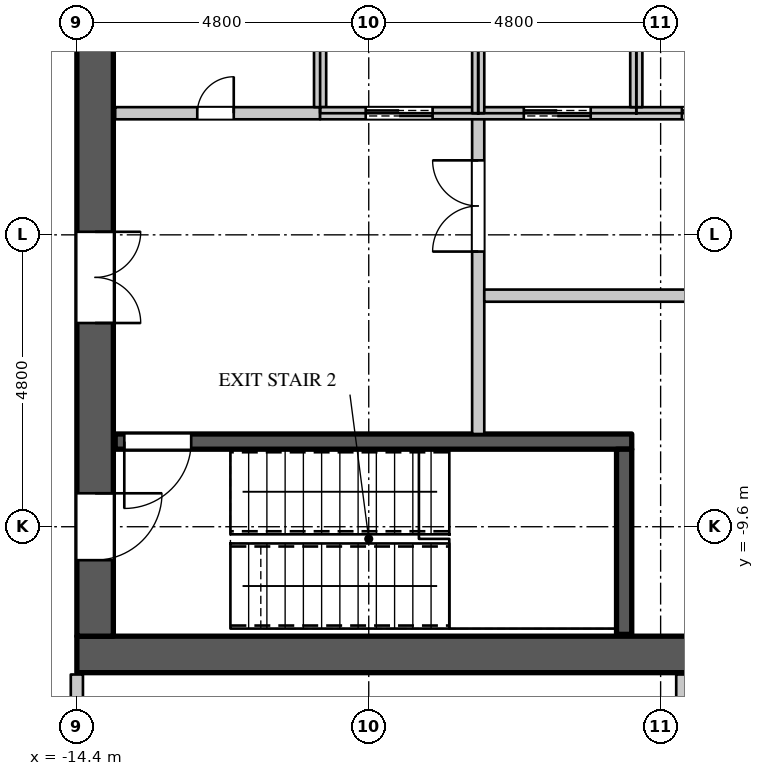
"""IFC4 building model, lengths in metres.
Left out: names, types, materials, properties, quantities, classifications, styles, units other than length and angle.
Written with IfcOpenShell. Run it as: python <this file> out.ifc"""

import sys

from ifc_helpers import new_model, si_unit, direction, frame, frame_2d, origin, place, context, subcontext, project, spatial, rectangle, extrude, element, fill, save


model = new_model("IFC4")
c1 = context("Model", 3, precision=1e-05, world=origin(), true_north=direction((0.0, 1.0)))
c2 = subcontext(c1, "Body", "Model", "MODEL_VIEW")
j1 = project(units=[si_unit("LENGTHUNIT", "METRE"), si_unit("PLANEANGLEUNIT", "RADIAN")], contexts=[c1])
p1 = place(None, origin())
s1 = spatial("IfcSite", under=j1, at=p1, CompositionType="ELEMENT")
p2 = place(p1, origin())
s2 = spatial("IfcBuilding", under=s1, at=p2, CompositionType="ELEMENT")
p3 = place(p2, frame((0.0, 0.0, 239.1)))
s3 = spatial("IfcBuildingStorey", under=s2, at=p3, CompositionType="ELEMENT", Elevation=239.1)
p4 = place(p3, frame((-14.4, -11.7, 0.0), z_axis=(0.0, 0.0, 1.0), x_axis=(1.0, 0.0, 0.0)))
e1 = element("IfcWall", 1, at=p4, inside=s3, PredefinedType="SHEAR", context=c2, shape_type="SweptSolid", body=[
    extrude(rectangle(XDim=28.8, YDim=0.6, at=frame_2d((14.4, 0.0))), origin(), (0.0, 0.0, 1.0), 4.2),
])
p5 = place(p3, frame((-14.1, -11.4, 0.0), z_axis=(0.0, 0.0, 1.0), x_axis=(0.0, 1.0, 0.0)))
e2 = element("IfcWall", 2, at=p5, inside=s3, PredefinedType="SHEAR", context=c2, shape_type="SweptSolid", body=[
    extrude(rectangle(XDim=22.8, YDim=0.6, at=frame_2d((11.4, 0.0))), origin(), (0.0, 0.0, 1.0), 4.2),
])
p6 = place(p5, frame((20.45, 0.0, 0.0)))
e3 = element("IfcOpeningElement", 3, at=p6, cuts=e2, PredefinedType="OPENING", context=c2, shape_type="SweptSolid", body=[
    extrude(rectangle(XDim=1.1, YDim=2.2, at=frame_2d((0.55, 1.1))), frame((0.0, 0.31, 0.0), z_axis=(0.0, -1.0, 0.0), x_axis=(1.0, 0.0, 0.0)), (0.0, 0.0, 1.0), 0.62),
])
p7 = place(p5, frame((1.25, 0.0, 0.0)))
e4 = element("IfcOpeningElement", 4, at=p7, cuts=e2, PredefinedType="OPENING", context=c2, shape_type="SweptSolid", body=[
    extrude(rectangle(XDim=1.1, YDim=2.2, at=frame_2d((0.55, 1.1))), frame((0.0, 0.31, 0.0), z_axis=(0.0, -1.0, 0.0), x_axis=(1.0, 0.0, 0.0)), (0.0, 0.0, 1.0), 0.62),
])
p8 = place(p5, frame((16.15, 0.0, 0.0)))
e5 = element("IfcOpeningElement", 5, at=p8, cuts=e2, PredefinedType="OPENING", context=c2, shape_type="SweptSolid", body=[
    extrude(rectangle(XDim=1.5, YDim=2.4, at=frame_2d((0.75, 1.2))), frame((0.0, 0.31, 0.0), z_axis=(0.0, -1.0, 0.0), x_axis=(1.0, 0.0, 0.0)), (0.0, 0.0, 1.0), 0.62),
])
p9 = place(p5, frame((5.15, 0.0, 0.0)))
e6 = element("IfcOpeningElement", 6, at=p9, cuts=e2, PredefinedType="OPENING", context=c2, shape_type="SweptSolid", body=[
    extrude(rectangle(XDim=1.5, YDim=2.4, at=frame_2d((0.75, 1.2))), frame((0.0, 0.31, 0.0), z_axis=(0.0, -1.0, 0.0), x_axis=(1.0, 0.0, 0.0)), (0.0, 0.0, 1.0), 0.62),
])
p10 = place(p3, frame((-14.4, -14.3, 0.0), z_axis=(0.0, 0.0, 1.0), x_axis=(0.0, 1.0, 0.0)))
e7 = element("IfcWall", 7, at=p10, inside=s3, PredefinedType="PARTITIONING", context=c2, shape_type="SweptSolid", body=[
    extrude(rectangle(XDim=2.27, YDim=0.2, at=frame_2d((1.135, 0.0))), origin(), (0.0, 0.0, 1.0), 3.95),
])
p11 = place(p3, frame((-7.8, -8.075, 0.0), z_axis=(0.0, 0.0, 1.0), x_axis=(0.0, 1.0, 0.0)))
e8 = element("IfcWall", 8, at=p11, inside=s3, PredefinedType="PARTITIONING", context=c2, shape_type="SweptSolid", body=[
    extrude(rectangle(XDim=5.275, YDim=0.2, at=frame_2d((2.637, 0.0))), origin(), (0.0, 0.0, 1.0), 3.95),
])
p12 = place(p11, frame((3.0, 0.0, 0.0)))
e9 = element("IfcOpeningElement", 9, at=p12, cuts=e8, PredefinedType="OPENING", context=c2, shape_type="SweptSolid", body=[
    extrude(rectangle(XDim=1.5, YDim=2.4, at=frame_2d((0.75, 1.2))), frame((0.0, 0.11, 0.0), z_axis=(0.0, -1.0, 0.0), x_axis=(1.0, 0.0, 0.0)), (0.0, 0.0, 1.0), 0.22),
])
p13 = place(p3, frame((-7.7, -5.8, 0.0), z_axis=(0.0, 0.0, 1.0), x_axis=(1.0, 0.0, 0.0)))
e10 = element("IfcWall", 10, at=p13, inside=s3, PredefinedType="PARTITIONING", context=c2, shape_type="SweptSolid", body=[
    extrude(rectangle(XDim=13.12, YDim=0.2, at=frame_2d((6.56, 0.0))), origin(), (0.0, 0.0, 1.0), 3.95),
])
p14 = place(p13, frame((3.45, 0.0, 0.0)))
e11 = element("IfcOpeningElement", 11, at=p14, cuts=e10, PredefinedType="OPENING", context=c2, shape_type="SweptSolid", body=[
    extrude(rectangle(XDim=0.9, YDim=2.2, at=frame_2d((0.45, 1.1))), frame((0.0, 0.11, 0.0), z_axis=(0.0, -1.0, 0.0), x_axis=(1.0, 0.0, 0.0)), (0.0, 0.0, 1.0), 0.22),
])
p15 = place(p13, frame((9.85, 0.0, 0.0)))
e12 = element("IfcOpeningElement", 12, at=p15, cuts=e10, PredefinedType="OPENING", context=c2, shape_type="SweptSolid", body=[
    extrude(rectangle(XDim=0.9, YDim=2.2, at=frame_2d((0.45, 1.1))), frame((0.0, 0.11, 0.0), z_axis=(0.0, -1.0, 0.0), x_axis=(1.0, 0.0, 0.0)), (0.0, 0.0, 1.0), 0.22),
])
p16 = place(p3, frame((-4.469, -25.95, 0.0), z_axis=(0.0, 0.0, 1.0), x_axis=(0.0, 1.0, 0.0)))
e13 = element("IfcWall", 13, at=p16, inside=s3, PredefinedType="PARTITIONING", context=c2, shape_type="SweptSolid", body=[
    extrude(rectangle(XDim=13.92, YDim=0.15, at=frame_2d((6.96, 0.0))), origin(), (0.0, 0.0, 1.0), 3.3),
])
p17 = place(p16, frame((3.3, 0.0, 0.0)))
e14 = element("IfcOpeningElement", 14, at=p17, cuts=e13, PredefinedType="OPENING", context=c2, shape_type="SweptSolid", body=[
    extrude(rectangle(XDim=0.95, YDim=2.2, at=frame_2d((0.475, 1.1))), frame((0.0, 0.085, 0.0), z_axis=(0.0, -1.0, 0.0), x_axis=(1.0, 0.0, 0.0)), (0.0, 0.0, 1.0), 0.17),
])
p18 = place(p3, frame((-13.77, -2.8, 0.0), z_axis=(0.0, 0.0, 1.0), x_axis=(1.0, 0.0, 0.0)))
e15 = element("IfcWall", 15, at=p18, inside=s3, PredefinedType="PARTITIONING", context=c2, shape_type="SweptSolid", body=[
    extrude(rectangle(XDim=3.37, YDim=0.2, at=frame_2d((1.685, 0.0))), origin(), (0.0, 0.0, 1.0), 3.95),
])
p19 = place(p18, frame((1.35, 0.0, 0.0)))
e16 = element("IfcOpeningElement", 16, at=p19, cuts=e15, PredefinedType="OPENING", context=c2, shape_type="SweptSolid", body=[
    extrude(rectangle(XDim=0.6, YDim=2.0, at=frame_2d((0.3, 1.0))), frame((0.0, 0.11, 0.0), z_axis=(0.0, -1.0, 0.0), x_axis=(1.0, 0.0, 0.0)), (0.0, 0.0, 1.0), 0.22),
])
p20 = place(p3, frame((-10.4, -2.7, 0.0), z_axis=(0.0, 0.0, 1.0), x_axis=(0.0, 1.0, 0.0)))
e17 = element("IfcWall", 17, at=p20, inside=s3, PredefinedType="PARTITIONING", context=c2, shape_type="SweptSolid", body=[
    extrude(rectangle(XDim=2.7, YDim=0.2, at=frame_2d((1.35, 0.0))), origin(), (0.0, 0.0, 1.0), 3.95),
])
p21 = place(p3, frame((-10.4, -2.8, 0.0), z_axis=(0.0, 0.0, 1.0), x_axis=(1.0, 0.0, 0.0)))
e18 = element("IfcWall", 18, at=p21, inside=s3, PredefinedType="PARTITIONING", context=c2, shape_type="SweptSolid", body=[
    extrude(rectangle(XDim=18.2, YDim=0.2, at=frame_2d((9.1, 0.0))), origin(), (0.0, 0.0, 1.0), 3.95),
])
p22 = place(p21, frame((0.75, 0.0, 0.0)))
e19 = element("IfcOpeningElement", 19, at=p22, cuts=e18, PredefinedType="OPENING", context=c2, shape_type="SweptSolid", body=[
    extrude(rectangle(XDim=1.1, YDim=2.2, at=frame_2d((0.55, 1.1))), frame((0.0, 0.11, 0.0), z_axis=(0.0, -1.0, 0.0), x_axis=(1.0, 0.0, 0.0)), (0.0, 0.0, 1.0), 0.22),
])
p23 = place(p21, frame((3.35, 0.0, 0.0)))
e20 = element("IfcOpeningElement", 20, at=p23, cuts=e18, PredefinedType="OPENING", context=c2, shape_type="SweptSolid", body=[
    extrude(rectangle(XDim=1.1, YDim=2.2, at=frame_2d((0.55, 1.1))), frame((0.0, 0.11, 0.0), z_axis=(0.0, -1.0, 0.0), x_axis=(1.0, 0.0, 0.0)), (0.0, 0.0, 1.0), 0.22),
])
p24 = place(p21, frame((5.95, 0.0, 0.0)))
e21 = element("IfcOpeningElement", 21, at=p24, cuts=e18, PredefinedType="OPENING", context=c2, shape_type="SweptSolid", body=[
    extrude(rectangle(XDim=1.1, YDim=2.2, at=frame_2d((0.55, 1.1))), frame((0.0, 0.11, 0.0), z_axis=(0.0, -1.0, 0.0), x_axis=(1.0, 0.0, 0.0)), (0.0, 0.0, 1.0), 0.22),
])
p25 = place(p21, frame((8.55, 0.0, 0.0)))
e22 = element("IfcOpeningElement", 22, at=p25, cuts=e18, PredefinedType="OPENING", context=c2, shape_type="SweptSolid", body=[
    extrude(rectangle(XDim=1.1, YDim=2.2, at=frame_2d((0.55, 1.1))), frame((0.0, 0.11, 0.0), z_axis=(0.0, -1.0, 0.0), x_axis=(1.0, 0.0, 0.0)), (0.0, 0.0, 1.0), 0.22),
])
p26 = place(p21, frame((11.15, 0.0, 0.0)))
e23 = element("IfcOpeningElement", 23, at=p26, cuts=e18, PredefinedType="OPENING", context=c2, shape_type="SweptSolid", body=[
    extrude(rectangle(XDim=1.1, YDim=2.2, at=frame_2d((0.55, 1.1))), frame((0.0, 0.11, 0.0), z_axis=(0.0, -1.0, 0.0), x_axis=(1.0, 0.0, 0.0)), (0.0, 0.0, 1.0), 0.22),
])
p27 = place(p21, frame((13.75, 0.0, 0.0)))
e24 = element("IfcOpeningElement", 24, at=p27, cuts=e18, PredefinedType="OPENING", context=c2, shape_type="SweptSolid", body=[
    extrude(rectangle(XDim=1.1, YDim=2.2, at=frame_2d((0.55, 1.1))), frame((0.0, 0.11, 0.0), z_axis=(0.0, -1.0, 0.0), x_axis=(1.0, 0.0, 0.0)), (0.0, 0.0, 1.0), 0.22),
])
p28 = place(p21, frame((16.35, 0.0, 0.0)))
e25 = element("IfcOpeningElement", 25, at=p28, cuts=e18, PredefinedType="OPENING", context=c2, shape_type="SweptSolid", body=[
    extrude(rectangle(XDim=1.1, YDim=2.2, at=frame_2d((0.55, 1.1))), frame((0.0, 0.11, 0.0), z_axis=(0.0, -1.0, 0.0), x_axis=(1.0, 0.0, 0.0)), (0.0, 0.0, 1.0), 0.22),
])
p29 = place(p3, frame((-7.8, -2.8, 0.0), z_axis=(0.0, 0.0, 1.0), x_axis=(0.0, 1.0, 0.0)))
e26 = element("IfcWall", 26, at=p29, inside=s3, PredefinedType="PARTITIONING", context=c2, shape_type="SweptSolid", body=[
    extrude(rectangle(XDim=2.8, YDim=0.2, at=frame_2d((1.4, 0.0))), origin(), (0.0, 0.0, 1.0), 3.95),
])
p30 = place(p3, frame((-5.2, -2.7, 0.0), z_axis=(0.0, 0.0, 1.0), x_axis=(0.0, 1.0, 0.0)))
e27 = element("IfcWall", 27, at=p30, inside=s3, PredefinedType="PARTITIONING", context=c2, shape_type="SweptSolid", body=[
    extrude(rectangle(XDim=2.6, YDim=0.2, at=frame_2d((1.3, 0.0))), origin(), (0.0, 0.0, 1.0), 3.95),
])
p31 = place(p3, frame((-13.77, -8.2, 0.0), z_axis=(0.0, 0.0, 1.0), x_axis=(1.0, 0.0, 0.0)))
e28 = element("IfcWall", 28, at=p31, inside=s3, PredefinedType="SHEAR", context=c2, shape_type="SweptSolid", body=[
    extrude(rectangle(XDim=8.495, YDim=0.25, at=frame_2d((4.248, 0.0))), origin(), (0.0, 0.0, 1.0), 3.95),
])
p32 = place(p31, frame((0.15, 0.0, 0.0)))
e29 = element("IfcOpeningElement", 29, at=p32, cuts=e28, PredefinedType="OPENING", context=c2, shape_type="SweptSolid", body=[
    extrude(rectangle(XDim=1.1, YDim=2.2, at=frame_2d((0.55, 1.1))), frame((0.0, 0.135, 0.0), z_axis=(0.0, -1.0, 0.0), x_axis=(1.0, 0.0, 0.0)), (0.0, 0.0, 1.0), 0.27),
])
p33 = place(p3, frame((-5.4, -11.37, 0.0), z_axis=(0.0, 0.0, 1.0), x_axis=(0.0, 1.0, 0.0)))
e30 = element("IfcWall", 30, at=p33, inside=s3, PredefinedType="SHEAR", context=c2, shape_type="SweptSolid", body=[
    extrude(rectangle(XDim=3.045, YDim=0.25, at=frame_2d((1.522, 0.0))), origin(), (0.0, 0.0, 1.0), 3.95),
])
p34 = place(p19, origin())
e31 = element("IfcDoor", 31, at=p34, inside=s3, OperationType="SINGLE_SWING_RIGHT", PredefinedType="DOOR", context=c2, shape_type="SweptSolid", body=[
    extrude(rectangle(XDim=0.6, YDim=2.0, at=frame_2d((0.3, 1.0))), frame((0.0, 0.025, 0.0), z_axis=(0.0, -1.0, 0.0), x_axis=(1.0, 0.0, 0.0)), (0.0, 0.0, 1.0), 0.05),
])
fill(e16, e31)
p35 = place(p22, origin())
e32 = element("IfcDoor", 32, at=p35, inside=s3, OperationType="DOUBLE_DOOR_SLIDING", PredefinedType="DOOR", context=c2, shape_type="SweptSolid", body=[
    extrude(rectangle(XDim=1.1, YDim=2.2, at=frame_2d((0.55, 1.1))), frame((0.0, 0.025, 0.0), z_axis=(0.0, -1.0, 0.0), x_axis=(1.0, 0.0, 0.0)), (0.0, 0.0, 1.0), 0.05),
])
fill(e19, e32)
p36 = place(p23, origin())
e33 = element("IfcDoor", 33, at=p36, inside=s3, OperationType="DOUBLE_DOOR_SLIDING", PredefinedType="DOOR", context=c2, shape_type="SweptSolid", body=[
    extrude(rectangle(XDim=1.1, YDim=2.2, at=frame_2d((0.55, 1.1))), frame((0.0, 0.025, 0.0), z_axis=(0.0, -1.0, 0.0), x_axis=(1.0, 0.0, 0.0)), (0.0, 0.0, 1.0), 0.05),
])
fill(e20, e33)
p37 = place(p24, origin())
e34 = element("IfcDoor", 34, at=p37, inside=s3, OperationType="DOUBLE_DOOR_SLIDING", PredefinedType="DOOR", context=c2, shape_type="SweptSolid", body=[
    extrude(rectangle(XDim=1.1, YDim=2.2, at=frame_2d((0.55, 1.1))), frame((0.0, 0.025, 0.0), z_axis=(0.0, -1.0, 0.0), x_axis=(1.0, 0.0, 0.0)), (0.0, 0.0, 1.0), 0.05),
])
fill(e21, e34)
p38 = place(p32, origin())
e35 = element("IfcDoor", 35, at=p38, inside=s3, OperationType="SINGLE_SWING_RIGHT", PredefinedType="DOOR", context=c2, shape_type="SweptSolid", body=[
    extrude(rectangle(XDim=1.1, YDim=2.2, at=frame_2d((0.55, 1.1))), frame((0.0, 0.025, 0.0), z_axis=(0.0, -1.0, 0.0), x_axis=(1.0, 0.0, 0.0)), (0.0, 0.0, 1.0), 0.05),
])
fill(e29, e35)
p39 = place(p12, origin())
e36 = element("IfcDoor", 36, at=p39, inside=s3, OperationType="DOUBLE_DOOR_SINGLE_SWING", PredefinedType="DOOR", context=c2, shape_type="SweptSolid", body=[
    extrude(rectangle(XDim=1.5, YDim=2.4, at=frame_2d((0.75, 1.2))), frame((0.0, 0.025, 0.0), z_axis=(0.0, -1.0, 0.0), x_axis=(1.0, 0.0, 0.0)), (0.0, 0.0, 1.0), 0.05),
])
fill(e9, e36)
p40 = place(p7, origin())
e37 = element("IfcDoor", 37, at=p40, inside=s3, OperationType="SINGLE_SWING_LEFT", PredefinedType="DOOR", context=c2, shape_type="SweptSolid", body=[
    extrude(rectangle(XDim=1.1, YDim=2.2, at=frame_2d((0.55, 1.1))), frame((0.0, -0.245, 0.0), z_axis=(0.0, -1.0, 0.0), x_axis=(1.0, 0.0, 0.0)), (0.0, 0.0, 1.0), 0.05),
])
fill(e4, e37)
p41 = place(p9, origin())
e38 = element("IfcDoor", 38, at=p41, inside=s3, OperationType="DOUBLE_DOOR_SINGLE_SWING", PredefinedType="DOOR", context=c2, shape_type="SweptSolid", body=[
    extrude(rectangle(XDim=1.5, YDim=2.4, at=frame_2d((0.75, 1.2))), frame((0.0, -0.245, 0.0), z_axis=(0.0, -1.0, 0.0), x_axis=(1.0, 0.0, 0.0)), (0.0, 0.0, 1.0), 0.05),
])
fill(e6, e38)
save(model, sys.argv[1])
